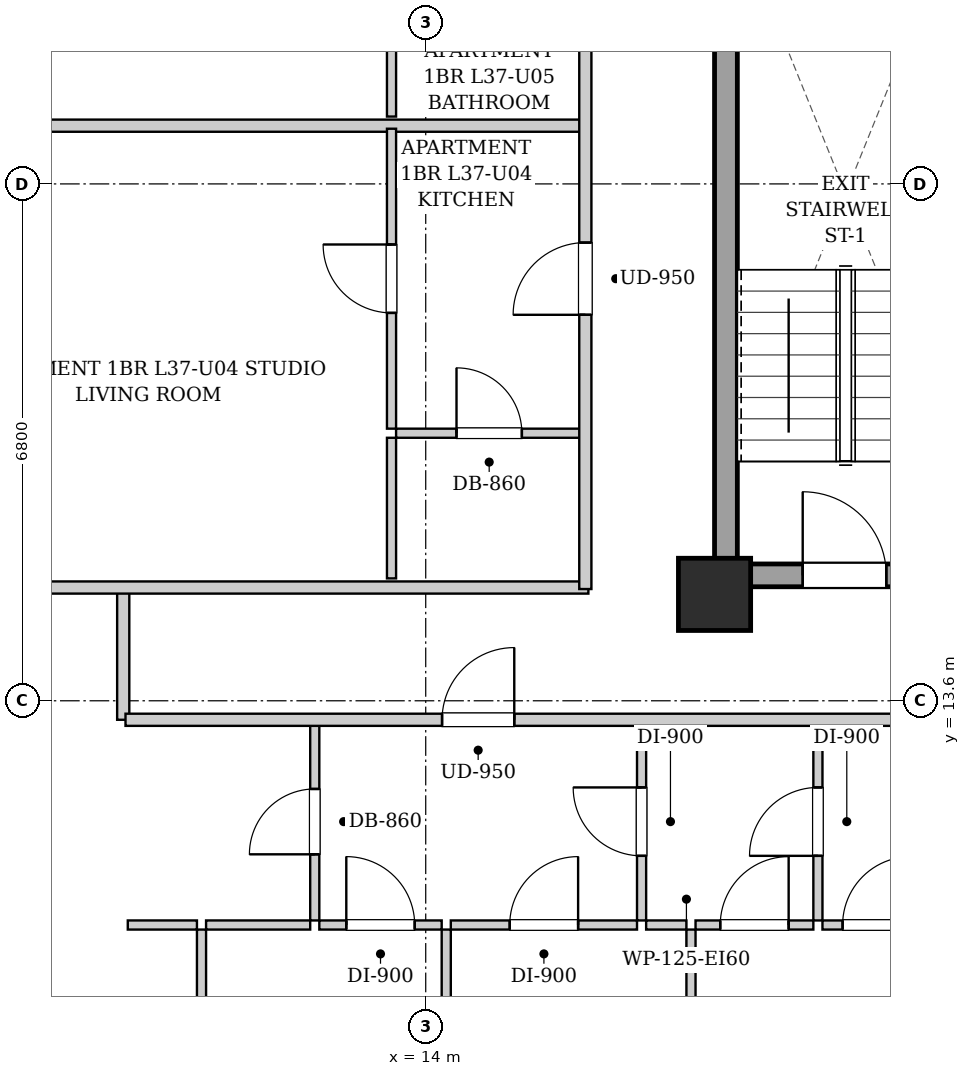
"""IFC4 building model, lengths in metres.
Left out: names, types, materials, properties, quantities, classifications, styles, units other than length and angle.
Written with IfcOpenShell. Run it as: python <this file> out.ifc"""

import sys

from ifc_helpers import new_model, si_unit, direction, frame, frame_2d, origin, origin_2d, place, context, subcontext, project, spatial, rectangle, extrude, element, fill, save


model = new_model("IFC4")
c1 = context("Model", 3, precision=1e-05, world=origin(), true_north=direction((0.0, 1.0)))
c2 = subcontext(c1, "Body", "Model", "MODEL_VIEW")
j1 = project(units=[si_unit("LENGTHUNIT", "METRE"), si_unit("PLANEANGLEUNIT", "RADIAN")], contexts=[c1])
p1 = place(None, origin())
s1 = spatial("IfcSite", under=j1, at=p1, CompositionType="ELEMENT")
p2 = place(p1, origin())
s2 = spatial("IfcBuilding", under=s1, at=p2, CompositionType="ELEMENT")
p3 = place(p2, frame((0.0, 0.0, 130.9)))
s3 = spatial("IfcBuildingStorey", under=s2, at=p3, CompositionType="ELEMENT", Elevation=130.9)
p4 = place(p3, frame((17.8, 15.0, 0.0), z_axis=(0.0, 0.0, 1.0), x_axis=(1.0, 0.0, 0.0)))
e1 = element("IfcColumn", 1, at=p4, inside=s3, PredefinedType="COLUMN", context=c2, shape_type="SweptSolid", body=[
    extrude(rectangle(XDim=0.95, YDim=0.95, at=origin_2d()), origin(), (0.0, 0.0, 1.0), 3.25),
])
p5 = place(p3, frame((17.95, 15.1, 0.0), z_axis=(0.0, 0.0, 1.0), x_axis=(0.0, 1.0, 0.0)))
e2 = element("IfcWall", 2, at=p5, inside=s3, PredefinedType="SHEAR", context=c2, shape_type="SweptSolid", body=[
    extrude(rectangle(XDim=9.0, YDim=0.3, at=frame_2d((4.5, 0.0))), origin(), (0.0, 0.0, 1.0), 2.99),
])
p6 = place(p3, frame((18.1, 15.25, 0.0), z_axis=(0.0, 0.0, 1.0), x_axis=(1.0, 0.0, 0.0)))
e3 = element("IfcWall", 3, at=p6, inside=s3, PredefinedType="SHEAR", context=c2, shape_type="SweptSolid", body=[
    extrude(rectangle(XDim=2.85, YDim=0.3, at=frame_2d((1.425, 0.0))), origin(), (0.0, 0.0, 1.0), 2.99),
])
p7 = place(p6, frame((0.86, 0.0, 0.0)))
e4 = element("IfcOpeningElement", 4, at=p7, cuts=e3, PredefinedType="OPENING", context=c2, shape_type="SweptSolid", body=[
    extrude(rectangle(XDim=1.1, YDim=2.05, at=frame_2d((0.55, 1.025))), frame((0.0, 0.16, 0.0), z_axis=(0.0, -1.0, 0.0), x_axis=(1.0, 0.0, 0.0)), (0.0, 0.0, 1.0), 0.32),
])
p8 = place(p3, frame((10.02, 13.35, 0.0), z_axis=(0.0, 0.0, 1.0), x_axis=(0.0, 1.0, 0.0)))
e5 = element("IfcWall", 5, at=p8, inside=s3, PredefinedType="PARTITIONING", context=c2, shape_type="SweptSolid", body=[
    extrude(rectangle(XDim=1.74, YDim=0.16, at=frame_2d((0.87, 0.0))), origin(), (0.0, 0.0, 1.0), 2.99),
])
p9 = place(p3, frame((7.78, 15.09, 0.0), z_axis=(0.0, 0.0, 1.0), x_axis=(1.0, 0.0, 0.0)))
e6 = element("IfcWall", 6, at=p9, inside=s3, PredefinedType="PARTITIONING", context=c2, shape_type="SweptSolid", body=[
    extrude(rectangle(XDim=8.36, YDim=0.16, at=frame_2d((4.18, 0.0))), origin(), (0.0, 0.0, 1.0), 2.426),
])
p10 = place(p3, frame((12.54, 10.71, 0.0), z_axis=(0.0, 0.0, 1.0), x_axis=(0.0, 1.0, 0.0)))
e7 = element("IfcWall", 7, at=p10, inside=s3, PredefinedType="PARTITIONING", context=c2, shape_type="SweptSolid", body=[
    extrude(rectangle(XDim=2.6, YDim=0.12, at=frame_2d((1.3, 0.0))), origin(), (0.0, 0.0, 1.0), 2.99),
])
p11 = place(p10, frame((0.87, 0.0, 0.0)))
e8 = element("IfcOpeningElement", 8, at=p11, cuts=e7, PredefinedType="OPENING", context=c2, shape_type="SweptSolid", body=[
    extrude(rectangle(XDim=0.86, YDim=2.05, at=frame_2d((0.43, 1.025))), frame((0.0, 0.07, 0.0), z_axis=(0.0, -1.0, 0.0), x_axis=(1.0, 0.0, 0.0)), (0.0, 0.0, 1.0), 0.14),
])
p12 = place(p3, frame((10.08, 10.65, 0.0), z_axis=(0.0, 0.0, 1.0), x_axis=(1.0, 0.0, 0.0)))
e9 = element("IfcWall", 9, at=p12, inside=s3, PredefinedType="PARTITIONING", context=c2, shape_type="SweptSolid", body=[
    extrude(rectangle(XDim=0.91, YDim=0.12, at=frame_2d((0.455, 0.0))), origin(), (0.0, 0.0, 1.0), 2.99),
])
p13 = place(p3, frame((11.11, 10.65, 0.0), z_axis=(0.0, 0.0, 1.0), x_axis=(1.0, 0.0, 0.0)))
e10 = element("IfcWall", 10, at=p13, inside=s3, PredefinedType="PARTITIONING", context=c2, shape_type="SweptSolid", body=[
    extrude(rectangle(XDim=1.37, YDim=0.12, at=frame_2d((0.685, 0.0))), origin(), (0.0, 0.0, 1.0), 2.99),
])
p14 = place(p3, frame((16.84, 10.71, 0.0), z_axis=(0.0, 0.0, 1.0), x_axis=(0.0, 1.0, 0.0)))
e11 = element("IfcWall", 11, at=p14, inside=s3, PredefinedType="PARTITIONING", context=c2, shape_type="SweptSolid", body=[
    extrude(rectangle(XDim=2.6, YDim=0.12, at=frame_2d((1.3, 0.0))), origin(), (0.0, 0.0, 1.0), 2.99),
])
p15 = place(p14, frame((0.85, 0.0, 0.0)))
e12 = element("IfcOpeningElement", 12, at=p15, cuts=e11, PredefinedType="OPENING", context=c2, shape_type="SweptSolid", body=[
    extrude(rectangle(XDim=0.9, YDim=2.05, at=frame_2d((0.45, 1.025))), frame((0.0, 0.07, 0.0), z_axis=(0.0, -1.0, 0.0), x_axis=(1.0, 0.0, 0.0)), (0.0, 0.0, 1.0), 0.14),
])
p16 = place(p3, frame((12.6, 10.65, 0.0), z_axis=(0.0, 0.0, 1.0), x_axis=(1.0, 0.0, 0.0)))
e13 = element("IfcWall", 13, at=p16, inside=s3, PredefinedType="PARTITIONING", context=c2, shape_type="SweptSolid", body=[
    extrude(rectangle(XDim=1.61, YDim=0.12, at=frame_2d((0.805, 0.0))), origin(), (0.0, 0.0, 1.0), 2.99),
])
p17 = place(p16, frame((0.355, 0.0, 0.0)))
e14 = element("IfcOpeningElement", 14, at=p17, cuts=e13, PredefinedType="OPENING", context=c2, shape_type="SweptSolid", body=[
    extrude(rectangle(XDim=0.9, YDim=2.05, at=frame_2d((0.45, 1.025))), frame((0.0, 0.07, 0.0), z_axis=(0.0, -1.0, 0.0), x_axis=(1.0, 0.0, 0.0)), (0.0, 0.0, 1.0), 0.14),
])
p18 = place(p3, frame((14.33, 10.65, 0.0), z_axis=(0.0, 0.0, 1.0), x_axis=(1.0, 0.0, 0.0)))
e15 = element("IfcWall", 15, at=p18, inside=s3, PredefinedType="PARTITIONING", context=c2, shape_type="SweptSolid", body=[
    extrude(rectangle(XDim=2.45, YDim=0.12, at=frame_2d((1.225, 0.0))), origin(), (0.0, 0.0, 1.0), 2.99),
])
p19 = place(p18, frame((0.775, 0.0, 0.0)))
e16 = element("IfcOpeningElement", 16, at=p19, cuts=e15, PredefinedType="OPENING", context=c2, shape_type="SweptSolid", body=[
    extrude(rectangle(XDim=0.9, YDim=2.05, at=frame_2d((0.45, 1.025))), frame((0.0, 0.07, 0.0), z_axis=(0.0, -1.0, 0.0), x_axis=(1.0, 0.0, 0.0)), (0.0, 0.0, 1.0), 0.14),
])
p20 = place(p3, frame((19.16, 10.71, 0.0), z_axis=(0.0, 0.0, 1.0), x_axis=(0.0, 1.0, 0.0)))
e17 = element("IfcWall", 17, at=p20, inside=s3, PredefinedType="PARTITIONING", context=c2, shape_type="SweptSolid", body=[
    extrude(rectangle(XDim=2.6, YDim=0.12, at=frame_2d((1.3, 0.0))), origin(), (0.0, 0.0, 1.0), 2.99),
])
p21 = place(p20, frame((0.85, 0.0, 0.0)))
e18 = element("IfcOpeningElement", 18, at=p21, cuts=e17, PredefinedType="OPENING", context=c2, shape_type="SweptSolid", body=[
    extrude(rectangle(XDim=0.9, YDim=2.05, at=frame_2d((0.45, 1.025))), frame((0.0, 0.07, 0.0), z_axis=(0.0, -1.0, 0.0), x_axis=(1.0, 0.0, 0.0)), (0.0, 0.0, 1.0), 0.14),
])
p22 = place(p3, frame((16.9, 10.65, 0.0), z_axis=(0.0, 0.0, 1.0), x_axis=(1.0, 0.0, 0.0)))
e19 = element("IfcWall", 19, at=p22, inside=s3, PredefinedType="PARTITIONING", context=c2, shape_type="SweptSolid", body=[
    extrude(rectangle(XDim=0.53, YDim=0.12, at=frame_2d((0.265, 0.0))), origin(), (0.0, 0.0, 1.0), 2.99),
])
p23 = place(p3, frame((17.55, 10.65, 0.0), z_axis=(0.0, 0.0, 1.0), x_axis=(1.0, 0.0, 0.0)))
e20 = element("IfcWall", 20, at=p23, inside=s3, PredefinedType="PARTITIONING", context=c2, shape_type="SweptSolid", body=[
    extrude(rectangle(XDim=1.55, YDim=0.12, at=frame_2d((0.775, 0.0))), origin(), (0.0, 0.0, 1.0), 2.99),
])
p24 = place(p23, frame((0.325, 0.0, 0.0)))
e21 = element("IfcOpeningElement", 21, at=p24, cuts=e20, PredefinedType="OPENING", context=c2, shape_type="SweptSolid", body=[
    extrude(rectangle(XDim=0.9, YDim=2.05, at=frame_2d((0.45, 1.025))), frame((0.0, 0.07, 0.0), z_axis=(0.0, -1.0, 0.0), x_axis=(1.0, 0.0, 0.0)), (0.0, 0.0, 1.0), 0.14),
])
p25 = place(p3, frame((19.22, 10.65, 0.0), z_axis=(0.0, 0.0, 1.0), x_axis=(1.0, 0.0, 0.0)))
e22 = element("IfcWall", 22, at=p25, inside=s3, PredefinedType="PARTITIONING", context=c2, shape_type="SweptSolid", body=[
    extrude(rectangle(XDim=1.43, YDim=0.12, at=frame_2d((0.715, 0.0))), origin(), (0.0, 0.0, 1.0), 2.99),
])
p26 = place(p25, frame((0.265, 0.0, 0.0)))
e23 = element("IfcOpeningElement", 23, at=p26, cuts=e22, PredefinedType="OPENING", context=c2, shape_type="SweptSolid", body=[
    extrude(rectangle(XDim=0.9, YDim=2.05, at=frame_2d((0.45, 1.025))), frame((0.0, 0.07, 0.0), z_axis=(0.0, -1.0, 0.0), x_axis=(1.0, 0.0, 0.0)), (0.0, 0.0, 1.0), 0.14),
])
p27 = place(p3, frame((11.05, 4.08, 0.0), z_axis=(0.0, 0.0, 1.0), x_axis=(0.0, 1.0, 0.0)))
e24 = element("IfcWall", 24, at=p27, inside=s3, PredefinedType="PARTITIONING", context=c2, shape_type="SweptSolid", body=[
    extrude(rectangle(XDim=6.51, YDim=0.12, at=frame_2d((3.255, 0.0))), origin(), (0.0, 0.0, 1.0), 2.99),
])
p28 = place(p27, frame((2.79, 0.0, 0.0)))
e25 = element("IfcOpeningElement", 25, at=p28, cuts=e24, PredefinedType="OPENING", context=c2, shape_type="SweptSolid", body=[
    extrude(rectangle(XDim=0.9, YDim=2.05, at=frame_2d((0.45, 1.025))), frame((0.0, 0.07, 0.0), z_axis=(0.0, -1.0, 0.0), x_axis=(1.0, 0.0, 0.0)), (0.0, 0.0, 1.0), 0.14),
])
p29 = place(p3, frame((14.27, 6.23, 0.0), z_axis=(0.0, 0.0, 1.0), x_axis=(0.0, 1.0, 0.0)))
e26 = element("IfcWall", 26, at=p29, inside=s3, PredefinedType="PARTITIONING", context=c2, shape_type="SweptSolid", body=[
    extrude(rectangle(XDim=4.36, YDim=0.12, at=frame_2d((2.18, 0.0))), origin(), (0.0, 0.0, 1.0), 2.99),
])
p30 = place(p29, frame((1.73, 0.0, 0.0)))
e27 = element("IfcOpeningElement", 27, at=p30, cuts=e26, PredefinedType="OPENING", context=c2, shape_type="SweptSolid", body=[
    extrude(rectangle(XDim=0.9, YDim=2.05, at=frame_2d((0.45, 1.025))), frame((0.0, 0.07, 0.0), z_axis=(0.0, -1.0, 0.0), x_axis=(1.0, 0.0, 0.0)), (0.0, 0.0, 1.0), 0.14),
])
p31 = place(p3, frame((17.49, 4.08, 0.0), z_axis=(0.0, 0.0, 1.0), x_axis=(0.0, 1.0, 0.0)))
e28 = element("IfcWall", 28, at=p31, inside=s3, PredefinedType="PARTITIONING", context=c2, shape_type="SweptSolid", body=[
    extrude(rectangle(XDim=6.51, YDim=0.12, at=frame_2d((3.255, 0.0))), origin(), (0.0, 0.0, 1.0), 2.99),
])
p32 = place(p31, frame((2.79, 0.0, 0.0)))
e29 = element("IfcOpeningElement", 29, at=p32, cuts=e28, PredefinedType="OPENING", context=c2, shape_type="SweptSolid", body=[
    extrude(rectangle(XDim=0.9, YDim=2.05, at=frame_2d((0.45, 1.025))), frame((0.0, 0.07, 0.0), z_axis=(0.0, -1.0, 0.0), x_axis=(1.0, 0.0, 0.0)), (0.0, 0.0, 1.0), 0.14),
])
p33 = place(p3, frame((7.78, 21.166, 0.0), z_axis=(0.0, 0.0, 1.0), x_axis=(1.0, 0.0, 0.0)))
e30 = element("IfcWall", 30, at=p33, inside=s3, PredefinedType="PARTITIONING", context=c2, shape_type="SweptSolid", body=[
    extrude(rectangle(XDim=8.28, YDim=0.16, at=frame_2d((4.14, 0.0))), origin(), (0.0, 0.0, 1.0), 2.99),
])
p34 = place(p3, frame((13.61, 17.12, 0.0), z_axis=(0.0, 0.0, 1.0), x_axis=(1.0, 0.0, 0.0)))
e31 = element("IfcWall", 31, at=p34, inside=s3, PredefinedType="PARTITIONING", context=c2, shape_type="SweptSolid", body=[
    extrude(rectangle(XDim=2.45, YDim=0.12, at=frame_2d((1.225, 0.0))), origin(), (0.0, 0.0, 1.0), 2.99),
])
p35 = place(p34, frame((0.795, 0.0, 0.0)))
e32 = element("IfcOpeningElement", 32, at=p35, cuts=e31, PredefinedType="OPENING", context=c2, shape_type="SweptSolid", body=[
    extrude(rectangle(XDim=0.86, YDim=2.05, at=frame_2d((0.43, 1.025))), frame((0.0, 0.07, 0.0), z_axis=(0.0, -1.0, 0.0), x_axis=(1.0, 0.0, 0.0)), (0.0, 0.0, 1.0), 0.14),
])
p36 = place(p3, frame((13.55, 15.21, 0.0), z_axis=(0.0, 0.0, 1.0), x_axis=(0.0, 1.0, 0.0)))
e33 = element("IfcWall", 33, at=p36, inside=s3, PredefinedType="PARTITIONING", context=c2, shape_type="SweptSolid", body=[
    extrude(rectangle(XDim=1.85, YDim=0.12, at=frame_2d((0.925, 0.0))), origin(), (0.0, 0.0, 1.0), 2.99),
])
p37 = place(p3, frame((13.55, 17.18, 0.0), z_axis=(0.0, 0.0, 1.0), x_axis=(0.0, 1.0, 0.0)))
e34 = element("IfcWall", 34, at=p37, inside=s3, PredefinedType="PARTITIONING", context=c2, shape_type="SweptSolid", body=[
    extrude(rectangle(XDim=3.946, YDim=0.12, at=frame_2d((1.973, 0.0))), origin(), (0.0, 0.0, 1.0), 2.99),
])
p38 = place(p37, frame((1.523, 0.0, 0.0)))
e35 = element("IfcOpeningElement", 35, at=p38, cuts=e34, PredefinedType="OPENING", context=c2, shape_type="SweptSolid", body=[
    extrude(rectangle(XDim=0.9, YDim=2.05, at=frame_2d((0.45, 1.025))), frame((0.0, 0.07, 0.0), z_axis=(0.0, -1.0, 0.0), x_axis=(1.0, 0.0, 0.0)), (0.0, 0.0, 1.0), 0.14),
])
p39 = place(p3, frame((13.55, 21.286, 0.0), z_axis=(0.0, 0.0, 1.0), x_axis=(0.0, 1.0, 0.0)))
e36 = element("IfcWall", 36, at=p39, inside=s3, PredefinedType="PARTITIONING", context=c2, shape_type="SweptSolid", body=[
    extrude(rectangle(XDim=2.121, YDim=0.12, at=frame_2d((1.061, 0.0))), origin(), (0.0, 0.0, 1.0), 2.99),
])
p40 = place(p3, frame((10.05, 13.35, 0.0), z_axis=(0.0, 0.0, 1.0), x_axis=(1.0, 0.0, 0.0)))
e37 = element("IfcWall", 37, at=p40, inside=s3, PredefinedType="PARTITIONING", context=c2, shape_type="SweptSolid", body=[
    extrude(rectangle(XDim=27.7, YDim=0.16, at=frame_2d((13.85, 0.0))), origin(), (0.0, 0.0, 1.0), 2.99),
])
p41 = place(p40, frame((4.165, 0.0, 0.0)))
e38 = element("IfcOpeningElement", 38, at=p41, cuts=e37, PredefinedType="OPENING", context=c2, shape_type="SweptSolid", body=[
    extrude(rectangle(XDim=0.95, YDim=2.1, at=frame_2d((0.475, 1.05))), frame((0.0, 0.09, 0.0), z_axis=(0.0, -1.0, 0.0), x_axis=(1.0, 0.0, 0.0)), (0.0, 0.0, 1.0), 0.18),
])
p42 = place(p3, frame((16.1, 15.07, 0.0), z_axis=(0.0, 0.0, 1.0), x_axis=(0.0, 1.0, 0.0)))
e39 = element("IfcWall", 39, at=p42, inside=s3, PredefinedType="PARTITIONING", context=c2, shape_type="SweptSolid", body=[
    extrude(rectangle(XDim=13.93, YDim=0.16, at=frame_2d((6.965, 0.0))), origin(), (0.0, 0.0, 1.0), 2.99),
])
p43 = place(p42, frame((3.608, 0.0, 0.0)))
e40 = element("IfcOpeningElement", 40, at=p43, cuts=e39, PredefinedType="OPENING", context=c2, shape_type="SweptSolid", body=[
    extrude(rectangle(XDim=0.95, YDim=2.1, at=frame_2d((0.475, 1.05))), frame((0.0, 0.09, 0.0), z_axis=(0.0, -1.0, 0.0), x_axis=(1.0, 0.0, 0.0)), (0.0, 0.0, 1.0), 0.18),
])
p44 = place(p42, frame((10.649, 0.0, 0.0)))
e41 = element("IfcOpeningElement", 41, at=p44, cuts=e39, PredefinedType="OPENING", context=c2, shape_type="SweptSolid", body=[
    extrude(rectangle(XDim=0.95, YDim=2.1, at=frame_2d((0.475, 1.05))), frame((0.0, 0.09, 0.0), z_axis=(0.0, -1.0, 0.0), x_axis=(1.0, 0.0, 0.0)), (0.0, 0.0, 1.0), 0.18),
])
p45 = place(p7, origin())
e42 = element("IfcDoor", 42, at=p45, inside=s3, OperationType="SINGLE_SWING_LEFT", PredefinedType="DOOR", context=c2, shape_type="SweptSolid", body=[
    extrude(rectangle(XDim=1.1, YDim=2.05, at=frame_2d((0.55, 1.025))), frame((0.0, 0.025, 0.0), z_axis=(0.0, -1.0, 0.0), x_axis=(1.0, 0.0, 0.0)), (0.0, 0.0, 1.0), 0.05),
])
fill(e4, e42)
p46 = place(p11, origin())
e43 = element("IfcDoor", 43, at=p46, inside=s3, OperationType="SINGLE_SWING_LEFT", PredefinedType="DOOR", context=c2, shape_type="SweptSolid", body=[
    extrude(rectangle(XDim=0.86, YDim=2.05, at=frame_2d((0.43, 1.025))), frame((0.0, 0.025, 0.0), z_axis=(0.0, -1.0, 0.0), x_axis=(1.0, 0.0, 0.0)), (0.0, 0.0, 1.0), 0.05),
])
fill(e8, e43)
p47 = place(p15, origin())
e44 = element("IfcDoor", 44, at=p47, inside=s3, OperationType="SINGLE_SWING_RIGHT", PredefinedType="DOOR", context=c2, shape_type="SweptSolid", body=[
    extrude(rectangle(XDim=0.9, YDim=2.05, at=frame_2d((0.45, 1.025))), frame((0.0, 0.025, 0.0), z_axis=(0.0, -1.0, 0.0), x_axis=(1.0, 0.0, 0.0)), (0.0, 0.0, 1.0), 0.05),
])
fill(e12, e44)
p48 = place(p17, origin())
e45 = element("IfcDoor", 45, at=p48, inside=s3, OperationType="SINGLE_SWING_LEFT", PredefinedType="DOOR", context=c2, shape_type="SweptSolid", body=[
    extrude(rectangle(XDim=0.9, YDim=2.05, at=frame_2d((0.45, 1.025))), frame((0.0, 0.025, 0.0), z_axis=(0.0, -1.0, 0.0), x_axis=(1.0, 0.0, 0.0)), (0.0, 0.0, 1.0), 0.05),
])
fill(e14, e45)
p49 = place(p19, origin())
e46 = element("IfcDoor", 46, at=p49, inside=s3, OperationType="SINGLE_SWING_RIGHT", PredefinedType="DOOR", context=c2, shape_type="SweptSolid", body=[
    extrude(rectangle(XDim=0.9, YDim=2.05, at=frame_2d((0.45, 1.025))), frame((0.0, 0.025, 0.0), z_axis=(0.0, -1.0, 0.0), x_axis=(1.0, 0.0, 0.0)), (0.0, 0.0, 1.0), 0.05),
])
fill(e16, e46)
p50 = place(p21, origin())
e47 = element("IfcDoor", 47, at=p50, inside=s3, OperationType="SINGLE_SWING_LEFT", PredefinedType="DOOR", context=c2, shape_type="SweptSolid", body=[
    extrude(rectangle(XDim=0.9, YDim=2.05, at=frame_2d((0.45, 1.025))), frame((0.0, 0.025, 0.0), z_axis=(0.0, -1.0, 0.0), x_axis=(1.0, 0.0, 0.0)), (0.0, 0.0, 1.0), 0.05),
])
fill(e18, e47)
p51 = place(p24, origin())
e48 = element("IfcDoor", 48, at=p51, inside=s3, OperationType="SINGLE_SWING_RIGHT", PredefinedType="DOOR", context=c2, shape_type="SweptSolid", body=[
    extrude(rectangle(XDim=0.9, YDim=2.05, at=frame_2d((0.45, 1.025))), frame((0.0, 0.025, 0.0), z_axis=(0.0, -1.0, 0.0), x_axis=(1.0, 0.0, 0.0)), (0.0, 0.0, 1.0), 0.05),
])
fill(e21, e48)
p52 = place(p26, origin())
e49 = element("IfcDoor", 49, at=p52, inside=s3, OperationType="SINGLE_SWING_RIGHT", PredefinedType="DOOR", context=c2, shape_type="SweptSolid", body=[
    extrude(rectangle(XDim=0.9, YDim=2.05, at=frame_2d((0.45, 1.025))), frame((0.0, 0.025, 0.0), z_axis=(0.0, -1.0, 0.0), x_axis=(1.0, 0.0, 0.0)), (0.0, 0.0, 1.0), 0.05),
])
fill(e23, e49)
p53 = place(p35, origin())
e50 = element("IfcDoor", 50, at=p53, inside=s3, OperationType="SINGLE_SWING_LEFT", PredefinedType="DOOR", context=c2, shape_type="SweptSolid", body=[
    extrude(rectangle(XDim=0.86, YDim=2.05, at=frame_2d((0.43, 1.025))), frame((0.0, 0.025, 0.0), z_axis=(0.0, -1.0, 0.0), x_axis=(1.0, 0.0, 0.0)), (0.0, 0.0, 1.0), 0.05),
])
fill(e32, e50)
p54 = place(p38, origin())
e51 = element("IfcDoor", 51, at=p54, inside=s3, OperationType="SINGLE_SWING_RIGHT", PredefinedType="DOOR", context=c2, shape_type="SweptSolid", body=[
    extrude(rectangle(XDim=0.9, YDim=2.05, at=frame_2d((0.45, 1.025))), frame((0.0, 0.025, 0.0), z_axis=(0.0, -1.0, 0.0), x_axis=(1.0, 0.0, 0.0)), (0.0, 0.0, 1.0), 0.05),
])
fill(e35, e51)
p55 = place(p41, origin())
e52 = element("IfcDoor", 52, at=p55, inside=s3, OperationType="SINGLE_SWING_RIGHT", PredefinedType="DOOR", context=c2, shape_type="SweptSolid", body=[
    extrude(rectangle(XDim=0.95, YDim=2.1, at=frame_2d((0.475, 1.05))), frame((0.0, 0.025, 0.0), z_axis=(0.0, -1.0, 0.0), x_axis=(1.0, 0.0, 0.0)), (0.0, 0.0, 1.0), 0.05),
])
fill(e38, e52)
p56 = place(p43, origin())
e53 = element("IfcDoor", 53, at=p56, inside=s3, OperationType="SINGLE_SWING_LEFT", PredefinedType="DOOR", context=c2, shape_type="SweptSolid", body=[
    extrude(rectangle(XDim=0.95, YDim=2.1, at=frame_2d((0.475, 1.05))), frame((0.0, 0.025, 0.0), z_axis=(0.0, -1.0, 0.0), x_axis=(1.0, 0.0, 0.0)), (0.0, 0.0, 1.0), 0.05),
])
fill(e40, e53)
save(model, sys.argv[1])
